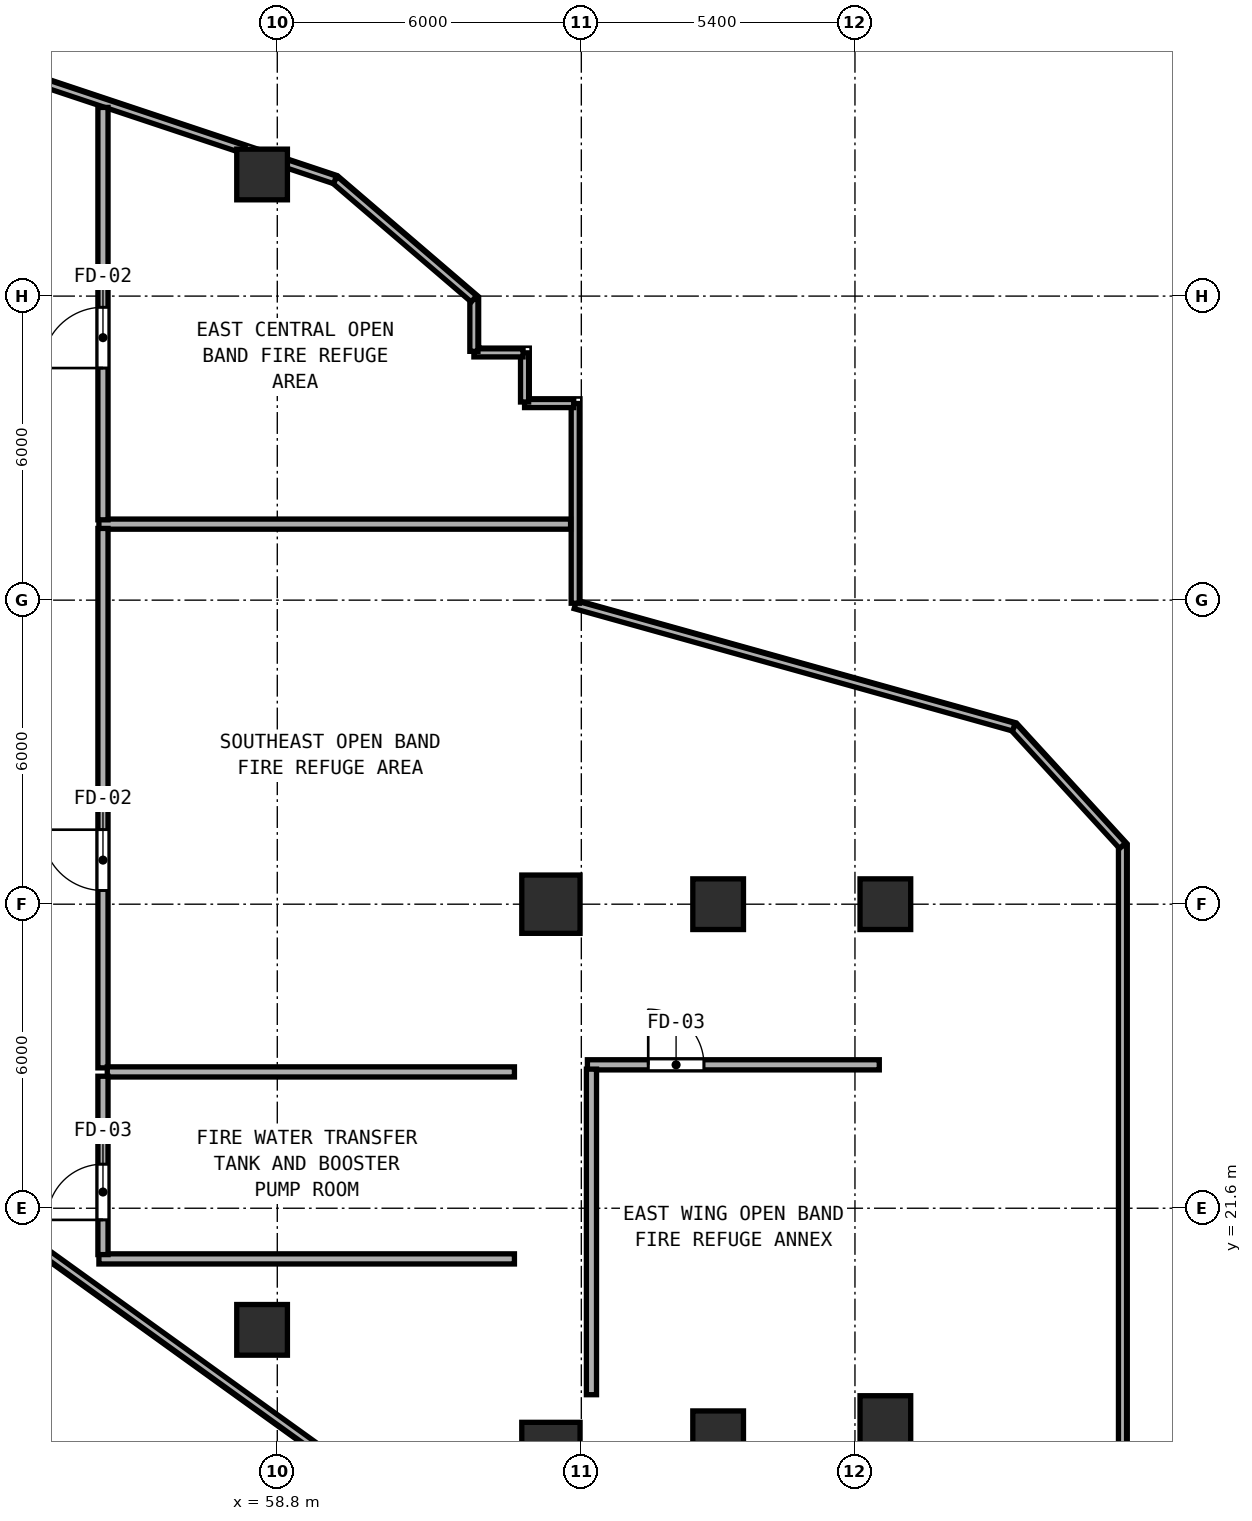
"""IFC4 building model, lengths in metres.
Left out: names, types, materials, properties, quantities, classifications, styles, units other than length and angle.
Written with IfcOpenShell. Run it as: python <this file> out.ifc"""

import sys

from ifc_helpers import new_model, si_unit, direction, frame, frame_2d, origin, origin_2d, place, context, subcontext, project, spatial, rectangle, hollow_rectangle, extrude, element, fill, save


model = new_model("IFC4")
c1 = context("Model", 3, precision=1e-05, world=origin(), true_north=direction((0.0, 1.0)))
c2 = subcontext(c1, "Body", "Model", "MODEL_VIEW")
j1 = project(units=[si_unit("LENGTHUNIT", "METRE"), si_unit("PLANEANGLEUNIT", "RADIAN")], contexts=[c1])
p1 = place(None, origin())
s1 = spatial("IfcSite", under=j1, at=p1, CompositionType="ELEMENT")
p2 = place(p1, origin())
s2 = spatial("IfcBuilding", under=s1, at=p2, CompositionType="ELEMENT")
p3 = place(p2, frame((0.0, 0.0, 89.4)))
s3 = spatial("IfcBuildingStorey", under=s2, at=p3, CompositionType="ELEMENT", Elevation=89.4)
for number, where, z_axis, x_axis in (
    (1, (64.2, 16.8, 0.0), (0.0, 0.0, 1.0), (1.0, 0.0, 0.0)),
    (2, (64.2, 27.6, 0.0), (0.0, 0.0, 1.0), (1.0, 0.0, 0.0)),
):
    element("IfcColumn", number, at=place(p3, frame(where, z_axis=z_axis, x_axis=x_axis)), inside=s3, PredefinedType="COLUMN", context=c2, shape_type="SweptSolid", body=[
        extrude(hollow_rectangle(XDim=1.15, YDim=1.15, WallThickness=0.042, at=origin_2d()), origin(), (0.0, 0.0, 1.0), 4.6),
    ])
for number, where, z_axis, x_axis in (
    (3, (70.8, 17.4, 0.0), (0.0, 0.0, 1.0), (1.0, 0.0, 0.0)),
    (4, (70.8, 27.6, 0.0), (0.0, 0.0, 1.0), (1.0, 0.0, 0.0)),
    (5, (58.5, 19.2, 0.0), (0.0, 0.0, 1.0), (1.0, 0.0, 0.0)),
    (6, (58.5, 42.0, 0.0), (0.0, 0.0, 1.0), (1.0, 0.0, 0.0)),
    (7, (67.5, 17.1, 0.0), (0.0, 0.0, 1.0), (1.0, 0.0, 0.0)),
    (8, (67.5, 27.6, 0.0), (0.0, 0.0, 1.0), (1.0, 0.0, 0.0)),
):
    element("IfcColumn", number, at=place(p3, frame(where, z_axis=z_axis, x_axis=x_axis)), inside=s3, PredefinedType="COLUMN", context=c2, shape_type="SweptSolid", body=[
        extrude(hollow_rectangle(XDim=1.0, YDim=1.0, WallThickness=0.038, at=origin_2d()), origin(), (0.0, 0.0, 1.0), 4.6),
    ])
p4 = place(p3, frame((53.367, 21.34, 0.0), z_axis=(0.0, 0.0, 1.0), x_axis=(0.811535552009, -0.584303044511, 0.0)))
e9 = element("IfcWall", 9, at=p4, inside=s3, PredefinedType="PARAPET", context=c2, shape_type="SweptSolid", body=[
    extrude(rectangle(XDim=11.476, YDim=0.16, at=frame_2d((5.738, 0.0))), origin(), (0.0, 0.0, 1.0), 1.15),
])
p5 = place(p3, frame((75.48, 7.95, 0.0), z_axis=(0.0, 0.0, 1.0), x_axis=(0.0, 1.0, 0.0)))
e10 = element("IfcWall", 10, at=p5, inside=s3, PredefinedType="PARAPET", context=c2, shape_type="SweptSolid", body=[
    extrude(rectangle(XDim=20.803, YDim=0.16, at=frame_2d((10.402, 0.0))), origin(), (0.0, 0.0, 1.0), 1.15),
])
p6 = place(p3, frame((75.48, 28.753, 0.0), z_axis=(0.0, 0.0, 1.0), x_axis=(-0.675755969938, 0.737125409339, 0.0)))
e11 = element("IfcWall", 11, at=p6, inside=s3, PredefinedType="PARAPET", context=c2, shape_type="SweptSolid", body=[
    extrude(rectangle(XDim=3.175, YDim=0.16, at=frame_2d((1.587, 0.0))), origin(), (0.0, 0.0, 1.0), 1.15),
])
p7 = place(p3, frame((73.335, 31.094, 0.0), z_axis=(0.0, 0.0, 1.0), x_axis=(-0.963196464929, 0.268798381595, 0.0)))
e12 = element("IfcWall", 12, at=p7, inside=s3, PredefinedType="PARAPET", context=c2, shape_type="SweptSolid", body=[
    extrude(rectangle(XDim=8.986, YDim=0.16, at=frame_2d((4.493, 0.0))), origin(), (0.0, 0.0, 1.0), 1.15),
])
p8 = place(p3, frame((64.68, 33.539, 0.0), z_axis=(0.0, 0.0, 1.0), x_axis=(0.0, 1.0, 0.0)))
e13 = element("IfcWall", 13, at=p8, inside=s3, PredefinedType="PARAPET", context=c2, shape_type="SweptSolid", body=[
    extrude(rectangle(XDim=3.941, YDim=0.16, at=frame_2d((1.971, 0.0))), origin(), (0.0, 0.0, 1.0), 1.15),
])
for number, where, z_axis, x_axis in (
    (14, (64.65, 37.48, 0.0), (0.0, 0.0, 1.0), (-1.0, 0.0, 0.0)),
    (15, (63.68, 37.51, 0.0), (0.0, 0.0, 1.0), (0.0, 1.0, 0.0)),
    (16, (63.65, 38.48, 0.0), (0.0, 0.0, 1.0), (-1.0, 0.0, 0.0)),
):
    element("IfcWall", number, at=place(p3, frame(where, z_axis=z_axis, x_axis=x_axis)), inside=s3, PredefinedType="PARAPET", context=c2, shape_type="SweptSolid", body=[
        extrude(rectangle(XDim=0.97, YDim=0.16, at=frame_2d((0.485, 0.0))), origin(), (0.0, 0.0, 1.0), 1.15),
    ])
p9 = place(p3, frame((62.68, 38.51, 0.0), z_axis=(0.0, 0.0, 1.0), x_axis=(0.0, 1.0, 0.0)))
e17 = element("IfcWall", 17, at=p9, inside=s3, PredefinedType="PARAPET", context=c2, shape_type="SweptSolid", body=[
    extrude(rectangle(XDim=1.035, YDim=0.16, at=frame_2d((0.518, 0.0))), origin(), (0.0, 0.0, 1.0), 1.15),
])
p10 = place(p3, frame((62.68, 39.545, 0.0), z_axis=(0.0, 0.0, 1.0), x_axis=(-0.759275702513, 0.650769089289, 0.0)))
e18 = element("IfcWall", 18, at=p10, inside=s3, PredefinedType="PARAPET", context=c2, shape_type="SweptSolid", body=[
    extrude(rectangle(XDim=3.609, YDim=0.16, at=frame_2d((1.805, 0.0))), origin(), (0.0, 0.0, 1.0), 1.15),
])
p11 = place(p3, frame((59.94, 41.894, 0.0), z_axis=(0.0, 0.0, 1.0), x_axis=(-0.948683298051, 0.316227766017, 0.0)))
e19 = element("IfcWall", 19, at=p11, inside=s3, PredefinedType="PARAPET", context=c2, shape_type="SweptSolid", body=[
    extrude(rectangle(XDim=0.999, YDim=0.16, at=frame_2d((0.5, 0.0))), origin(), (0.0, 0.0, 1.0), 1.15),
])
p12 = place(p3, frame((58.145, 42.492, 0.0), z_axis=(0.0, 0.0, 1.0), x_axis=(-0.948683298051, 0.316227766017, 0.0)))
e20 = element("IfcWall", 20, at=p12, inside=s3, PredefinedType="PARAPET", context=c2, shape_type="SweptSolid", body=[
    extrude(rectangle(XDim=5.76, YDim=0.16, at=frame_2d((2.88, 0.0))), origin(), (0.0, 0.0, 1.0), 1.15),
])
p13 = place(p3, frame((55.28, 35.1, 0.0), z_axis=(0.0, 0.0, 1.0), x_axis=(1.0, 0.0, 0.0)))
e21 = element("IfcWall", 21, at=p13, inside=s3, PredefinedType="SOLIDWALL", context=c2, shape_type="SweptSolid", body=[
    extrude(rectangle(XDim=9.308, YDim=0.2, at=frame_2d((4.654, 0.0))), origin(), (0.0, 0.0, 1.0), 4.35),
])
p14 = place(p3, frame((55.36, 24.37, 0.0), z_axis=(0.0, 0.0, 1.0), x_axis=(0.0, 1.0, 0.0)))
e22 = element("IfcWall", 22, at=p14, inside=s3, PredefinedType="SOLIDWALL", context=c2, shape_type="SweptSolid", body=[
    extrude(rectangle(XDim=10.645, YDim=0.2, at=frame_2d((5.322, 0.0))), origin(), (0.0, 0.0, 1.0), 4.35),
])
p15 = place(p14, frame((3.5, 0.0, 0.0)))
e23 = element("IfcOpeningElement", 23, at=p15, cuts=e22, PredefinedType="OPENING", context=c2, shape_type="SweptSolid", body=[
    extrude(rectangle(XDim=1.2, YDim=2.15, at=frame_2d((0.6, 1.075))), frame((0.0, 0.11, 0.0), z_axis=(0.0, -1.0, 0.0), x_axis=(1.0, 0.0, 0.0)), (0.0, 0.0, 1.0), 0.22),
])
p16 = place(p3, frame((55.36, 35.185, 0.0), z_axis=(0.0, 0.0, 1.0), x_axis=(0.0, 1.0, 0.0)))
e24 = element("IfcWall", 24, at=p16, inside=s3, PredefinedType="SOLIDWALL", context=c2, shape_type="SweptSolid", body=[
    extrude(rectangle(XDim=8.138, YDim=0.2, at=frame_2d((4.069, 0.0))), origin(), (0.0, 0.0, 1.0), 4.35),
])
p17 = place(p16, frame((2.995, 0.0, 0.0)))
e25 = element("IfcOpeningElement", 25, at=p17, cuts=e24, PredefinedType="OPENING", context=c2, shape_type="SweptSolid", body=[
    extrude(rectangle(XDim=1.2, YDim=2.15, at=frame_2d((0.6, 1.075))), frame((0.0, 0.11, 0.0), z_axis=(0.0, -1.0, 0.0), x_axis=(1.0, 0.0, 0.0)), (0.0, 0.0, 1.0), 0.22),
])
p18 = place(p3, frame((55.445, 24.29, 0.0), z_axis=(0.0, 0.0, 1.0), x_axis=(1.0, 0.0, 0.0)))
e26 = element("IfcWall", 26, at=p18, inside=s3, PredefinedType="SOLIDWALL", context=c2, shape_type="SweptSolid", body=[
    extrude(rectangle(XDim=8.035, YDim=0.2, at=frame_2d((4.018, 0.0))), origin(), (0.0, 0.0, 1.0), 4.35),
])
p19 = place(p3, frame((55.28, 20.6, 0.0), z_axis=(0.0, 0.0, 1.0), x_axis=(1.0, 0.0, 0.0)))
e27 = element("IfcWall", 27, at=p19, inside=s3, PredefinedType="SOLIDWALL", context=c2, shape_type="SweptSolid", body=[
    extrude(rectangle(XDim=8.2, YDim=0.2, at=frame_2d((4.1, 0.0))), origin(), (0.0, 0.0, 1.0), 4.35),
])
p20 = place(p3, frame((55.36, 20.685, 0.0), z_axis=(0.0, 0.0, 1.0), x_axis=(0.0, 1.0, 0.0)))
e28 = element("IfcWall", 28, at=p20, inside=s3, PredefinedType="SOLIDWALL", context=c2, shape_type="SweptSolid", body=[
    extrude(rectangle(XDim=3.52, YDim=0.2, at=frame_2d((1.76, 0.0))), origin(), (0.0, 0.0, 1.0), 4.35),
])
p21 = place(p20, frame((0.685, 0.0, 0.0)))
e29 = element("IfcOpeningElement", 29, at=p21, cuts=e28, PredefinedType="OPENING", context=c2, shape_type="SweptSolid", body=[
    extrude(rectangle(XDim=1.1, YDim=2.15, at=frame_2d((0.55, 1.075))), frame((0.0, 0.11, 0.0), z_axis=(0.0, -1.0, 0.0), x_axis=(1.0, 0.0, 0.0)), (0.0, 0.0, 1.0), 0.22),
])
p22 = place(p3, frame((64.92, 24.43, 0.0), z_axis=(0.0, 0.0, 1.0), x_axis=(1.0, 0.0, 0.0)))
e30 = element("IfcWall", 30, at=p22, inside=s3, PredefinedType="SOLIDWALL", context=c2, shape_type="SweptSolid", body=[
    extrude(rectangle(XDim=5.76, YDim=0.2, at=frame_2d((2.88, 0.0))), origin(), (0.0, 0.0, 1.0), 4.35),
])
p23 = place(p22, frame((2.3, 0.0, 0.0), z_axis=(0.0, 0.0, 1.0), x_axis=(-1.0, 0.0, 0.0)))
e31 = element("IfcOpeningElement", 31, at=p23, cuts=e30, PredefinedType="OPENING", context=c2, shape_type="SweptSolid", body=[
    extrude(rectangle(XDim=1.1, YDim=2.15, at=frame_2d((0.55, 1.075))), frame((0.0, 0.11, 0.0), z_axis=(0.0, -1.0, 0.0), x_axis=(1.0, 0.0, 0.0)), (0.0, 0.0, 1.0), 0.22),
])
p24 = place(p3, frame((65.0, 17.92, 0.0), z_axis=(0.0, 0.0, 1.0), x_axis=(0.0, 1.0, 0.0)))
e32 = element("IfcWall", 32, at=p24, inside=s3, PredefinedType="SOLIDWALL", context=c2, shape_type="SweptSolid", body=[
    extrude(rectangle(XDim=6.425, YDim=0.2, at=frame_2d((3.212, 0.0))), origin(), (0.0, 0.0, 1.0), 4.35),
])
p25 = place(p15, origin())
e33 = element("IfcDoor", 33, at=p25, inside=s3, OperationType="SINGLE_SWING_RIGHT", PredefinedType="DOOR", context=c2, shape_type="SweptSolid", body=[
    extrude(rectangle(XDim=1.2, YDim=2.15, at=frame_2d((0.6, 1.075))), frame((0.0, 0.025, 0.0), z_axis=(0.0, -1.0, 0.0), x_axis=(1.0, 0.0, 0.0)), (0.0, 0.0, 1.0), 0.05),
])
fill(e23, e33)
p26 = place(p17, origin())
e34 = element("IfcDoor", 34, at=p26, inside=s3, OperationType="SINGLE_SWING_LEFT", PredefinedType="DOOR", context=c2, shape_type="SweptSolid", body=[
    extrude(rectangle(XDim=1.2, YDim=2.15, at=frame_2d((0.6, 1.075))), frame((0.0, 0.025, 0.0), z_axis=(0.0, -1.0, 0.0), x_axis=(1.0, 0.0, 0.0)), (0.0, 0.0, 1.0), 0.05),
])
fill(e25, e34)
p27 = place(p21, origin())
e35 = element("IfcDoor", 35, at=p27, inside=s3, OperationType="SINGLE_SWING_LEFT", PredefinedType="DOOR", context=c2, shape_type="SweptSolid", body=[
    extrude(rectangle(XDim=1.1, YDim=2.15, at=frame_2d((0.55, 1.075))), frame((0.0, 0.025, 0.0), z_axis=(0.0, -1.0, 0.0), x_axis=(1.0, 0.0, 0.0)), (0.0, 0.0, 1.0), 0.05),
])
fill(e29, e35)
p28 = place(p23, origin())
e36 = element("IfcDoor", 36, at=p28, inside=s3, OperationType="SINGLE_SWING_RIGHT", PredefinedType="DOOR", context=c2, shape_type="SweptSolid", body=[
    extrude(rectangle(XDim=1.1, YDim=2.15, at=frame_2d((0.55, 1.075))), frame((0.0, 0.025, 0.0), z_axis=(0.0, -1.0, 0.0), x_axis=(1.0, 0.0, 0.0)), (0.0, 0.0, 1.0), 0.05),
])
fill(e31, e36)
save(model, sys.argv[1])
